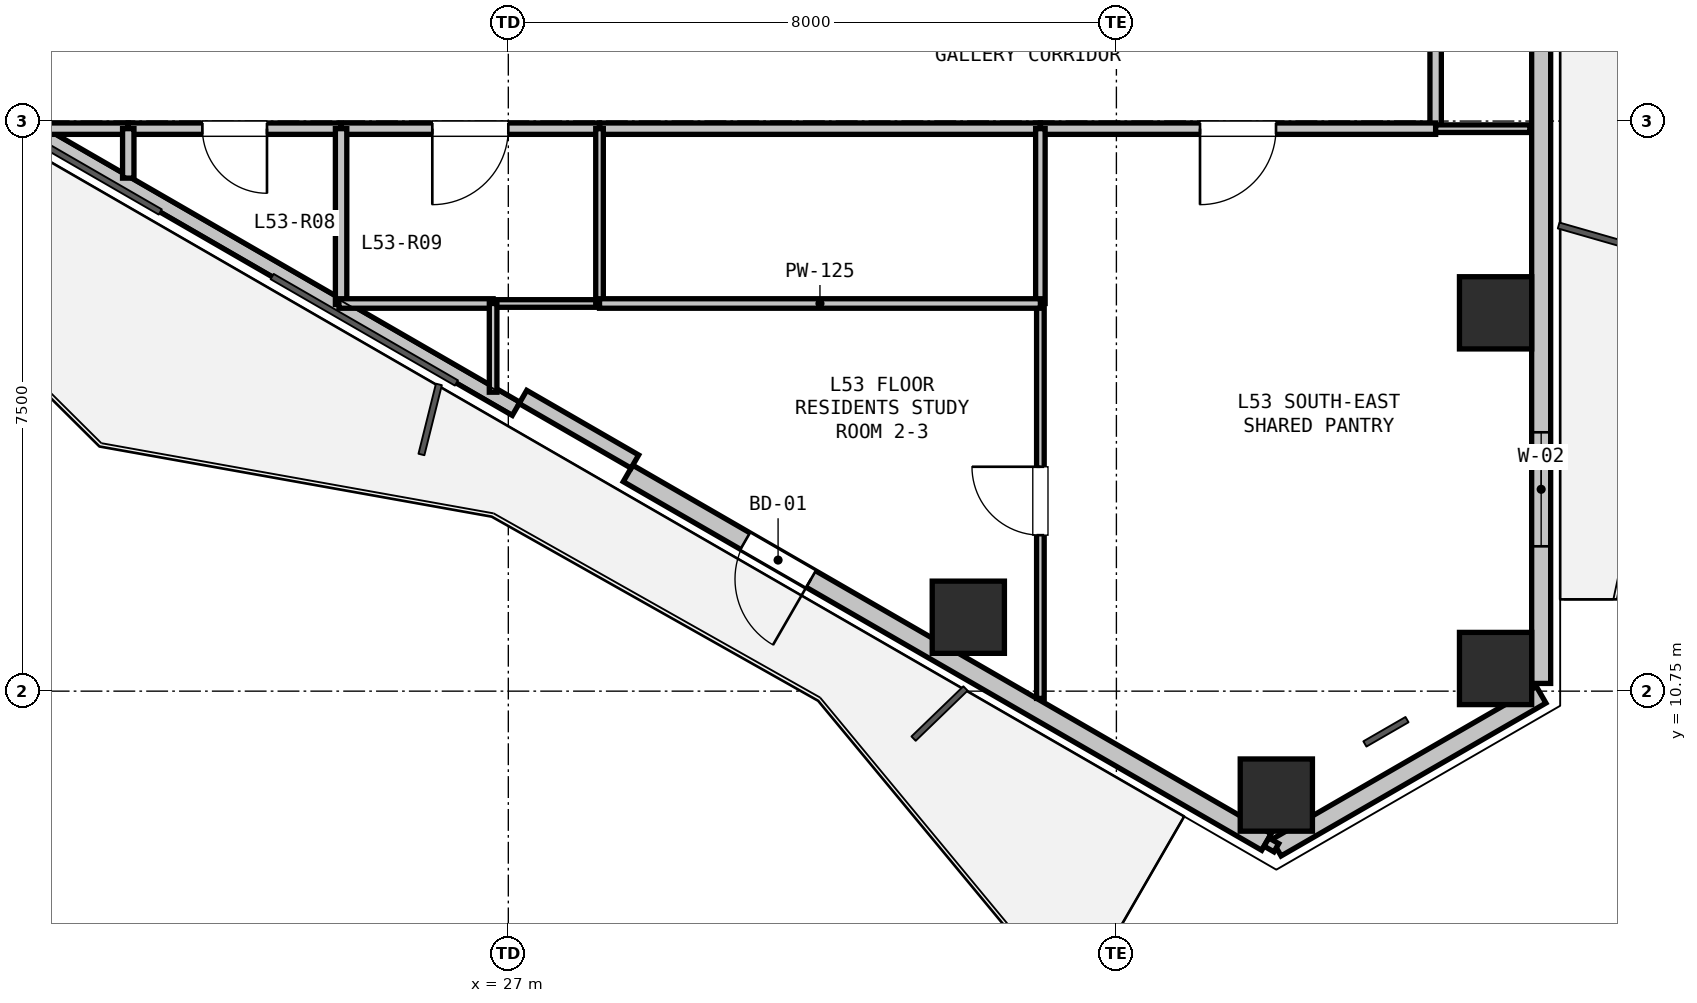
"""IFC4 building model, lengths in metres.
Left out: names, types, materials, properties, quantities, classifications, styles, units other than length and angle.
Written with IfcOpenShell. Run it as: python <this file> out.ifc"""

import sys

from ifc_helpers import new_model, si_unit, direction, frame, frame_2d, origin, origin_2d, place, context, subcontext, project, spatial, rectangle, hollow_rectangle, extrude, element, fill, save


model = new_model("IFC4")
c1 = context("Model", 3, precision=1e-05, world=origin(), true_north=direction((0.0, 1.0)))
c2 = subcontext(c1, "Body", "Model", "MODEL_VIEW")
j1 = project(units=[si_unit("LENGTHUNIT", "METRE"), si_unit("PLANEANGLEUNIT", "RADIAN")], contexts=[c1])
p1 = place(None, origin())
s1 = spatial("IfcSite", under=j1, at=p1, CompositionType="ELEMENT")
p2 = place(p1, origin())
s2 = spatial("IfcBuilding", under=s1, at=p2, CompositionType="ELEMENT")
p3 = place(p2, frame((0.0, 0.0, 192.0)))
s3 = spatial("IfcBuildingStorey", under=s2, at=p3, CompositionType="ELEMENT", Elevation=192.0)
for number, where, z_axis, x_axis in (
    (1, (39.988, 15.727, 0.0), (0.0, 0.0, 1.0), (1.0, 0.0, 0.0)),
    (2, (39.988, 11.048, 0.0), (0.0, 0.0, 1.0), (1.0, 0.0, 0.0)),
    (3, (37.104, 9.383, 0.0), (0.0, 0.0, 1.0), (1.0, 0.0, 0.0)),
    (4, (33.052, 11.722, 0.0), (0.0, 0.0, 1.0), (1.0, 0.0, 0.0)),
):
    element("IfcColumn", number, at=place(p3, frame(where, z_axis=z_axis, x_axis=x_axis)), inside=s3, PredefinedType="COLUMN", context=c2, shape_type="SweptSolid", body=[
        extrude(hollow_rectangle(XDim=0.95, YDim=0.95, WallThickness=0.028, at=origin_2d()), origin(), (0.0, 0.0, 1.0), 3.3),
    ])
p4 = place(p3, frame((40.588, 10.702, 0.0), z_axis=(0.0, 0.0, 1.0), x_axis=(-0.866023907196, -0.500002592159, 0.0)))
e5 = element("IfcWall", 5, at=p4, inside=s3, PredefinedType="SOLIDWALL", context=c2, shape_type="SweptSolid", body=[
    extrude(rectangle(XDim=4.023, YDim=0.25, at=frame_2d((2.012, 0.0))), origin(), (0.0, 0.0, 1.0), 2.69),
])
p5 = place(p3, frame((40.588, 20.551, 0.0), z_axis=(0.0, 0.0, 1.0), x_axis=(0.0, -1.0, 0.0)))
e6 = element("IfcWall", 6, at=p5, inside=s3, PredefinedType="SOLIDWALL", context=c2, shape_type="SweptSolid", body=[
    extrude(rectangle(XDim=9.699, YDim=0.25, at=frame_2d((4.85, 0.0))), origin(), (0.0, 0.0, 1.0), 2.69),
])
p6 = place(p5, frame((6.395, 0.0, 0.9)))
e7 = element("IfcOpeningElement", 7, at=p6, cuts=e6, PredefinedType="OPENING", context=c2, shape_type="SweptSolid", body=[
    extrude(rectangle(XDim=1.5, YDim=1.5, at=frame_2d((0.75, 0.75))), frame((0.0, 0.135, 0.0), z_axis=(0.0, -1.0, 0.0), x_axis=(1.0, 0.0, 0.0)), (0.0, 0.0, 1.0), 0.27),
])
p7 = place(p3, frame((36.974, 8.765, 0.0), z_axis=(0.0, 0.0, 1.0), x_axis=(-0.866016233231, 0.500015883528, 0.0)))
e8 = element("IfcWall", 8, at=p7, inside=s3, PredefinedType="SOLIDWALL", context=c2, shape_type="SweptSolid", body=[
    extrude(rectangle(XDim=9.699, YDim=0.25, at=frame_2d((4.85, 0.0))), origin(), (0.0, 0.0, 1.0), 2.69),
])
p8 = place(p7, frame((6.919, 0.0, 0.0)))
e9 = element("IfcOpeningElement", 9, at=p8, cuts=e8, PredefinedType="OPENING", context=c2, shape_type="SweptSolid", body=[
    extrude(rectangle(XDim=1.0, YDim=2.1, at=frame_2d((0.5, 1.05))), frame((0.0, 0.135, 0.0), z_axis=(0.0, -1.0, 0.0), x_axis=(1.0, 0.0, 0.0)), (0.0, 0.0, 1.0), 0.27),
])
p9 = place(p3, frame((27.102, 14.464, 0.0), z_axis=(0.0, 0.0, 1.0), x_axis=(-0.866020680503, 0.500008180874, 0.0)))
e10 = element("IfcWall", 10, at=p9, inside=s3, PredefinedType="PARAPET", context=c2, shape_type="SweptSolid", body=[
    extrude(rectangle(XDim=8.999, YDim=0.2, at=frame_2d((4.5, 0.0))), origin(), (0.0, 0.0, 1.0), 0.2),
])
p10 = place(p3, frame((28.665, 13.77, 0.0), z_axis=(0.0, 0.0, 1.0), x_axis=(-0.866025371046, 0.500000056704, 0.0)))
e11 = element("IfcWall", 11, at=p10, inside=s3, PredefinedType="PARAPET", context=c2, shape_type="SweptSolid", body=[
    extrude(rectangle(XDim=1.7, YDim=0.2, at=frame_2d((0.85, 0.0))), origin(), (0.0, 0.0, 1.0), 2.69),
])
p11 = place(p3, frame((39.2, 19.9, 0.0), z_axis=(0.0, 0.0, 1.0), x_axis=(0.0, -1.0, 0.0)))
e12 = element("IfcWall", 12, at=p11, inside=s3, PredefinedType="PARTITIONING", context=c2, shape_type="SweptSolid", body=[
    extrude(rectangle(XDim=1.75, YDim=0.15, at=frame_2d((0.875, 0.0))), origin(), (0.0, 0.0, 1.0), 3.07),
])
p12 = place(p3, frame((39.2, 18.15, 0.0), z_axis=(0.0, 0.0, 1.0), x_axis=(-1.0, 0.0, 0.0)))
e13 = element("IfcWall", 13, at=p12, inside=s3, PredefinedType="PARTITIONING", context=c2, shape_type="SweptSolid", body=[
    extrude(rectangle(XDim=5.2, YDim=0.15, at=frame_2d((2.6, 0.0))), origin(), (0.0, 0.0, 1.0), 2.518),
])
p13 = place(p12, frame((2.1, 0.0, 0.0)))
e14 = element("IfcOpeningElement", 14, at=p13, cuts=e13, PredefinedType="OPENING", context=c2, shape_type="SweptSolid", body=[
    extrude(rectangle(XDim=1.0, YDim=2.15, at=frame_2d((0.5, 1.075))), frame((0.0, 0.085, 0.0), z_axis=(0.0, -1.0, 0.0), x_axis=(1.0, 0.0, 0.0)), (0.0, 0.0, 1.0), 0.17),
])
p14 = place(p3, frame((34.0, 18.15, 0.0), z_axis=(0.0, 0.0, 1.0), x_axis=(-1.0, 0.0, 0.0)))
e15 = element("IfcWall", 15, at=p14, inside=s3, PredefinedType="PARTITIONING", context=c2, shape_type="SweptSolid", body=[
    extrude(rectangle(XDim=5.8, YDim=0.15, at=frame_2d((2.9, 0.0))), origin(), (0.0, 0.0, 1.0), 3.07),
])
p15 = place(p3, frame((28.2, 18.15, 0.0), z_axis=(0.0, 0.0, 1.0), x_axis=(-1.0, 0.0, 0.0)))
e16 = element("IfcWall", 16, at=p15, inside=s3, PredefinedType="PARTITIONING", context=c2, shape_type="SweptSolid", body=[
    extrude(rectangle(XDim=3.4, YDim=0.15, at=frame_2d((1.7, 0.0))), origin(), (0.0, 0.0, 1.0), 2.518),
])
p16 = place(p15, frame((1.2, 0.0, 0.0)))
e17 = element("IfcOpeningElement", 17, at=p16, cuts=e16, PredefinedType="OPENING", context=c2, shape_type="SweptSolid", body=[
    extrude(rectangle(XDim=1.0, YDim=2.15, at=frame_2d((0.5, 1.075))), frame((0.0, 0.085, 0.0), z_axis=(0.0, -1.0, 0.0), x_axis=(1.0, 0.0, 0.0)), (0.0, 0.0, 1.0), 0.17),
])
p17 = place(p3, frame((24.8, 18.15, 0.0), z_axis=(0.0, 0.0, 1.0), x_axis=(-1.0, 0.0, 0.0)))
e18 = element("IfcWall", 18, at=p17, inside=s3, PredefinedType="PARTITIONING", context=c2, shape_type="SweptSolid", body=[
    extrude(rectangle(XDim=2.8, YDim=0.15, at=frame_2d((1.4, 0.0))), origin(), (0.0, 0.0, 1.0), 2.365),
])
p18 = place(p17, frame((0.975, 0.0, 0.0)))
e19 = element("IfcOpeningElement", 19, at=p18, cuts=e18, PredefinedType="OPENING", context=c2, shape_type="SweptSolid", body=[
    extrude(rectangle(XDim=0.85, YDim=2.1, at=frame_2d((0.425, 1.05))), frame((0.0, 0.085, 0.0), z_axis=(0.0, -1.0, 0.0), x_axis=(1.0, 0.0, 0.0)), (0.0, 0.0, 1.0), 0.17),
])
p19 = place(p3, frame((22.0, 18.15, 0.0), z_axis=(0.0, 0.0, 1.0), x_axis=(-1.0, 0.0, 0.0)))
e20 = element("IfcWall", 20, at=p19, inside=s3, PredefinedType="PARTITIONING", context=c2, shape_type="SweptSolid", body=[
    extrude(rectangle(XDim=1.212, YDim=0.15, at=frame_2d((0.606, 0.0))), origin(), (0.0, 0.0, 1.0), 2.365),
])
p20 = place(p3, frame((37.104, 8.69, 0.0), z_axis=(0.0, 0.0, 1.0), x_axis=(-0.866131372301, 0.499816412211, 0.0)))
e21 = element("IfcWall", 21, at=p20, inside=s3, PredefinedType="PARTITIONING", context=c2, shape_type="SweptSolid", body=[
    extrude(rectangle(XDim=0.15, YDim=0.125, at=frame_2d((0.075, 0.0))), origin(), (0.0, 0.0, 1.0), 3.07),
])
p21 = place(p3, frame((34.0, 10.654, 0.0), z_axis=(0.0, 0.0, 1.0), x_axis=(0.0, 1.0, 0.0)))
e22 = element("IfcWall", 22, at=p21, inside=s3, PredefinedType="PARTITIONING", context=c2, shape_type="SweptSolid", body=[
    extrude(rectangle(XDim=5.196, YDim=0.1, at=frame_2d((2.598, 0.0))), origin(), (0.0, 0.0, 1.0), 2.795),
])
p22 = place(p21, frame((2.148, 0.0, 0.0)))
e23 = element("IfcOpeningElement", 23, at=p22, cuts=e22, PredefinedType="OPENING", context=c2, shape_type="SweptSolid", body=[
    extrude(rectangle(XDim=0.9, YDim=2.1, at=frame_2d((0.45, 1.05))), frame((0.0, 0.06, 0.0), z_axis=(0.0, -1.0, 0.0), x_axis=(1.0, 0.0, 0.0)), (0.0, 0.0, 1.0), 0.12),
])
p23 = place(p3, frame((34.0, 15.85, 0.0), z_axis=(0.0, 0.0, 1.0), x_axis=(0.0, 1.0, 0.0)))
e24 = element("IfcWall", 24, at=p23, inside=s3, PredefinedType="PARTITIONING", context=c2, shape_type="SweptSolid", body=[
    extrude(rectangle(XDim=2.3, YDim=0.125, at=frame_2d((1.15, 0.0))), origin(), (0.0, 0.0, 1.0), 3.07),
])
p24 = place(p3, frame((39.2, 18.15, 0.0), z_axis=(0.0, 0.0, 1.0), x_axis=(1.0, 0.0, 0.0)))
e25 = element("IfcWall", 25, at=p24, inside=s3, PredefinedType="PARTITIONING", context=c2, shape_type="SweptSolid", body=[
    extrude(rectangle(XDim=1.24, YDim=0.1, at=frame_2d((0.62, 0.0))), origin(), (0.0, 0.0, 1.0), 2.365),
])
p25 = place(p3, frame((24.8, 18.15, 0.0), z_axis=(0.0, 0.0, 1.0), x_axis=(0.0, -1.0, 0.0)))
e26 = element("IfcWall", 26, at=p25, inside=s3, PredefinedType="PARTITIONING", context=c2, shape_type="SweptSolid", body=[
    extrude(rectangle(XDim=2.312, YDim=0.15, at=frame_2d((1.156, 0.0))), origin(), (0.0, 0.0, 1.0), 2.365),
])
p26 = place(p3, frame((22.0, 17.499, 0.0), z_axis=(0.0, 0.0, 1.0), x_axis=(0.0, 1.0, 0.0)))
e27 = element("IfcWall", 27, at=p26, inside=s3, PredefinedType="PARTITIONING", context=c2, shape_type="SweptSolid", body=[
    extrude(rectangle(XDim=0.651, YDim=0.15, at=frame_2d((0.325, 0.0))), origin(), (0.0, 0.0, 1.0), 2.365),
])
p27 = place(p3, frame((28.2, 15.85, 0.0), z_axis=(0.0, 0.0, 1.0), x_axis=(-1.0, 0.0, 0.0)))
e28 = element("IfcWall", 28, at=p27, inside=s3, PredefinedType="PARTITIONING", context=c2, shape_type="SweptSolid", body=[
    extrude(rectangle(XDim=1.4, YDim=0.1, at=frame_2d((0.7, 0.0))), origin(), (0.0, 0.0, 1.0), 2.518),
])
p28 = place(p3, frame((26.8, 15.85, 0.0), z_axis=(0.0, 0.0, 1.0), x_axis=(-1.0, 0.0, 0.0)))
e29 = element("IfcWall", 29, at=p28, inside=s3, PredefinedType="PARTITIONING", context=c2, shape_type="SweptSolid", body=[
    extrude(rectangle(XDim=2.029, YDim=0.125, at=frame_2d((1.014, 0.0))), origin(), (0.0, 0.0, 1.0), 2.365),
])
p29 = place(p3, frame((28.2, 18.15, 0.0), z_axis=(0.0, 0.0, 1.0), x_axis=(0.0, -1.0, 0.0)))
e30 = element("IfcWall", 30, at=p29, inside=s3, PredefinedType="PARTITIONING", context=c2, shape_type="SweptSolid", body=[
    extrude(rectangle(XDim=2.3, YDim=0.1, at=frame_2d((1.15, 0.0))), origin(), (0.0, 0.0, 1.0), 3.07),
])
p30 = place(p3, frame((28.2, 15.85, 0.0), z_axis=(0.0, 0.0, 1.0), x_axis=(1.0, 0.0, 0.0)))
e31 = element("IfcWall", 31, at=p30, inside=s3, PredefinedType="PARTITIONING", context=c2, shape_type="SweptSolid", body=[
    extrude(rectangle(XDim=5.8, YDim=0.125, at=frame_2d((2.9, 0.0))), origin(), (0.0, 0.0, 1.0), 3.07),
])
p31 = place(p3, frame((26.8, 14.683, 0.0), z_axis=(0.0, 0.0, 1.0), x_axis=(0.0, 1.0, 0.0)))
e32 = element("IfcWall", 32, at=p31, inside=s3, PredefinedType="PARTITIONING", context=c2, shape_type="SweptSolid", body=[
    extrude(rectangle(XDim=1.167, YDim=0.1, at=frame_2d((0.583, 0.0))), origin(), (0.0, 0.0, 1.0), 2.365),
])
p32 = place(p6, origin())
e33 = element("IfcWindow", 33, at=p32, inside=s3, PartitioningType="SINGLE_PANEL", PredefinedType="WINDOW", context=c2, shape_type="SweptSolid", body=[
    extrude(rectangle(XDim=1.5, YDim=1.5, at=frame_2d((0.75, 0.75))), frame((0.0, 0.03, 0.0), z_axis=(0.0, -1.0, 0.0), x_axis=(1.0, 0.0, 0.0)), (0.0, 0.0, 1.0), 0.06),
])
fill(e7, e33)
p33 = place(p8, origin())
e34 = element("IfcDoor", 34, at=p33, inside=s3, OperationType="SINGLE_SWING_LEFT", PredefinedType="DOOR", context=c2, shape_type="SweptSolid", body=[
    extrude(rectangle(XDim=1.0, YDim=2.1, at=frame_2d((0.5, 1.05))), frame((0.0, 0.025, 0.0), z_axis=(0.0, -1.0, 0.0), x_axis=(1.0, 0.0, 0.0)), (0.0, 0.0, 1.0), 0.05),
])
fill(e9, e34)
p34 = place(p13, origin())
e35 = element("IfcDoor", 35, at=p34, inside=s3, OperationType="SINGLE_SWING_RIGHT", PredefinedType="DOOR", context=c2, shape_type="SweptSolid", body=[
    extrude(rectangle(XDim=1.0, YDim=2.15, at=frame_2d((0.5, 1.075))), frame((0.0, 0.025, 0.0), z_axis=(0.0, -1.0, 0.0), x_axis=(1.0, 0.0, 0.0)), (0.0, 0.0, 1.0), 0.05),
])
fill(e14, e35)
p35 = place(p18, origin())
e36 = element("IfcDoor", 36, at=p35, inside=s3, OperationType="SINGLE_SWING_LEFT", PredefinedType="DOOR", context=c2, shape_type="SweptSolid", body=[
    extrude(rectangle(XDim=0.85, YDim=2.1, at=frame_2d((0.425, 1.05))), frame((0.0, 0.025, 0.0), z_axis=(0.0, -1.0, 0.0), x_axis=(1.0, 0.0, 0.0)), (0.0, 0.0, 1.0), 0.05),
])
fill(e19, e36)
p36 = place(p16, origin())
e37 = element("IfcDoor", 37, at=p36, inside=s3, OperationType="SINGLE_SWING_RIGHT", PredefinedType="DOOR", context=c2, shape_type="SweptSolid", body=[
    extrude(rectangle(XDim=1.0, YDim=2.15, at=frame_2d((0.5, 1.075))), frame((0.0, 0.025, 0.0), z_axis=(0.0, -1.0, 0.0), x_axis=(1.0, 0.0, 0.0)), (0.0, 0.0, 1.0), 0.05),
])
fill(e17, e37)
p37 = place(p22, origin())
e38 = element("IfcDoor", 38, at=p37, inside=s3, OperationType="SINGLE_SWING_RIGHT", PredefinedType="DOOR", context=c2, shape_type="SweptSolid", body=[
    extrude(rectangle(XDim=0.9, YDim=2.1, at=frame_2d((0.45, 1.05))), frame((0.0, 0.025, 0.0), z_axis=(0.0, -1.0, 0.0), x_axis=(1.0, 0.0, 0.0)), (0.0, 0.0, 1.0), 0.05),
])
fill(e23, e38)
save(model, sys.argv[1])
